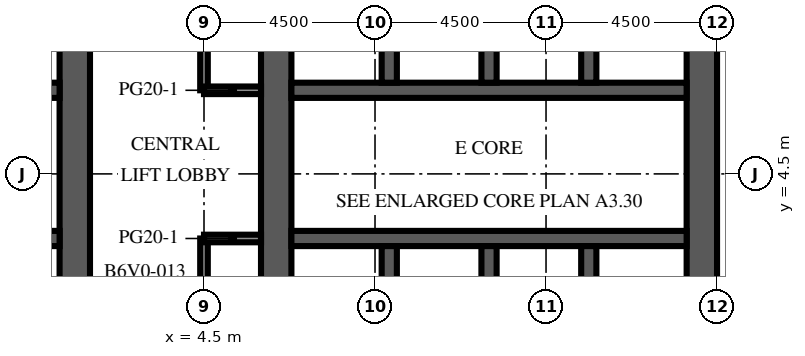
"""IFC4 building model, lengths in metres.
Left out: names, types, materials, properties, quantities, classifications, styles, units other than length and angle.
Written with IfcOpenShell. Run it as: python <this file> out.ifc"""

import sys

from ifc_helpers import new_model, si_unit, direction, frame, frame_2d, origin, place, context, subcontext, project, spatial, rectangle, extrude, element, fill, save


model = new_model("IFC4")
c1 = context("Model", 3, precision=1e-05, world=origin(), true_north=direction((0.0, 1.0)))
c2 = subcontext(c1, "Body", "Model", "MODEL_VIEW")
j1 = project(units=[si_unit("LENGTHUNIT", "METRE"), si_unit("PLANEANGLEUNIT", "RADIAN")], contexts=[c1])
p1 = place(None, origin())
s1 = spatial("IfcSite", under=j1, at=p1, CompositionType="ELEMENT")
p2 = place(p1, origin())
s2 = spatial("IfcBuilding", under=s1, at=p2, CompositionType="ELEMENT")
p3 = place(p2, frame((0.0, 0.0, 199.7)))
s3 = spatial("IfcBuildingStorey", under=s2, at=p3, CompositionType="ELEMENT", Elevation=199.7)
p4 = place(p3, frame((1.1, -9.0, 0.0), z_axis=(0.0, 0.0, 1.0), x_axis=(0.0, 1.0, 0.0)))
e1 = element("IfcWall", 1, at=p4, inside=s3, PredefinedType="SHEAR", context=c2, shape_type="SweptSolid", body=[
    extrude(rectangle(XDim=27.5, YDim=0.8, at=frame_2d((13.75, 0.0))), origin(), (0.0, 0.0, 1.0), 4.1),
])
p5 = place(p4, frame((12.55, 0.0, 0.0)))
e2 = element("IfcOpeningElement", 2, at=p5, cuts=e1, PredefinedType="OPENING", context=c2, shape_type="SweptSolid", body=[
    extrude(rectangle(XDim=2.4, YDim=2.4, at=frame_2d((1.2, 1.2))), frame((0.0, 0.41, 0.0), z_axis=(0.0, -1.0, 0.0), x_axis=(1.0, 0.0, 0.0)), (0.0, 0.0, 1.0), 0.82),
])
p6 = place(p4, frame((3.95, 0.0, 0.0)))
e3 = element("IfcOpeningElement", 3, at=p6, cuts=e1, PredefinedType="OPENING", context=c2, shape_type="SweptSolid", body=[
    extrude(rectangle(XDim=1.2, YDim=2.1, at=frame_2d((0.6, 1.05))), frame((0.0, 0.41, 0.0), z_axis=(0.0, -1.0, 0.0), x_axis=(1.0, 0.0, 0.0)), (0.0, 0.0, 1.0), 0.82),
])
p7 = place(p4, frame((19.45, 0.0, 0.0)))
e4 = element("IfcOpeningElement", 4, at=p7, cuts=e1, PredefinedType="OPENING", context=c2, shape_type="SweptSolid", body=[
    extrude(rectangle(XDim=1.0, YDim=2.1, at=frame_2d((0.5, 1.05))), frame((0.0, 0.41, 0.0), z_axis=(0.0, -1.0, 0.0), x_axis=(1.0, 0.0, 0.0)), (0.0, 0.0, 1.0), 0.82),
])
p8 = place(p4, frame((21.137, 0.0, 0.0)))
e5 = element("IfcOpeningElement", 5, at=p8, cuts=e1, PredefinedType="OPENING", context=c2, shape_type="SweptSolid", body=[
    extrude(rectangle(XDim=1.0, YDim=2.1, at=frame_2d((0.5, 1.05))), frame((0.0, 0.41, 0.0), z_axis=(0.0, -1.0, 0.0), x_axis=(1.0, 0.0, 0.0)), (0.0, 0.0, 1.0), 0.82),
])
p9 = place(p4, frame((23.2, 0.0, 0.0)))
e6 = element("IfcOpeningElement", 6, at=p9, cuts=e1, PredefinedType="OPENING", context=c2, shape_type="SweptSolid", body=[
    extrude(rectangle(XDim=1.0, YDim=2.1, at=frame_2d((0.5, 1.05))), frame((0.0, 0.41, 0.0), z_axis=(0.0, -1.0, 0.0), x_axis=(1.0, 0.0, 0.0)), (0.0, 0.0, 1.0), 0.82),
])
p10 = place(p4, frame((25.262, 0.0, 0.0)))
e7 = element("IfcOpeningElement", 7, at=p10, cuts=e1, PredefinedType="OPENING", context=c2, shape_type="SweptSolid", body=[
    extrude(rectangle(XDim=1.0, YDim=2.1, at=frame_2d((0.5, 1.05))), frame((0.0, 0.41, 0.0), z_axis=(0.0, -1.0, 0.0), x_axis=(1.0, 0.0, 0.0)), (0.0, 0.0, 1.0), 0.82),
])
p11 = place(p3, frame((-9.7, 2.8, 0.0), z_axis=(0.0, 0.0, 1.0), x_axis=(1.0, 0.0, 0.0)))
e8 = element("IfcWall", 8, at=p11, inside=s3, PredefinedType="SHEAR", context=c2, shape_type="SweptSolid", body=[
    extrude(rectangle(XDim=10.4, YDim=0.4, at=frame_2d((5.2, 0.0))), origin(), (0.0, 0.0, 1.0), 4.1),
])
p12 = place(p11, frame((0.738, 0.0, 0.0)))
e9 = element("IfcOpeningElement", 9, at=p12, cuts=e8, PredefinedType="OPENING", context=c2, shape_type="SweptSolid", body=[
    extrude(rectangle(XDim=1.1, YDim=2.1, at=frame_2d((0.55, 1.05))), frame((0.0, 0.21, 0.0), z_axis=(0.0, -1.0, 0.0), x_axis=(1.0, 0.0, 0.0)), (0.0, 0.0, 1.0), 0.42),
])
p13 = place(p11, frame((3.337, 0.0, 0.0)))
e10 = element("IfcOpeningElement", 10, at=p13, cuts=e8, PredefinedType="OPENING", context=c2, shape_type="SweptSolid", body=[
    extrude(rectangle(XDim=1.1, YDim=2.1, at=frame_2d((0.55, 1.05))), frame((0.0, 0.21, 0.0), z_axis=(0.0, -1.0, 0.0), x_axis=(1.0, 0.0, 0.0)), (0.0, 0.0, 1.0), 0.42),
])
p14 = place(p11, frame((6.012, 0.0, 0.0)))
e11 = element("IfcOpeningElement", 11, at=p14, cuts=e8, PredefinedType="OPENING", context=c2, shape_type="SweptSolid", body=[
    extrude(rectangle(XDim=1.0, YDim=2.1, at=frame_2d((0.5, 1.05))), frame((0.0, 0.21, 0.0), z_axis=(0.0, -1.0, 0.0), x_axis=(1.0, 0.0, 0.0)), (0.0, 0.0, 1.0), 0.42),
])
p15 = place(p11, frame((8.613, 0.0, 0.0)))
e12 = element("IfcOpeningElement", 12, at=p15, cuts=e8, PredefinedType="OPENING", context=c2, shape_type="SweptSolid", body=[
    extrude(rectangle(XDim=1.0, YDim=2.1, at=frame_2d((0.5, 1.05))), frame((0.0, 0.21, 0.0), z_axis=(0.0, -1.0, 0.0), x_axis=(1.0, 0.0, 0.0)), (0.0, 0.0, 1.0), 0.42),
])
p16 = place(p3, frame((-9.7, 6.7, 0.0), z_axis=(0.0, 0.0, 1.0), x_axis=(1.0, 0.0, 0.0)))
e13 = element("IfcWall", 13, at=p16, inside=s3, PredefinedType="SHEAR", context=c2, shape_type="SweptSolid", body=[
    extrude(rectangle(XDim=10.4, YDim=0.4, at=frame_2d((5.2, 0.0))), origin(), (0.0, 0.0, 1.0), 4.1),
])
p17 = place(p16, frame((3.337, 0.0, 0.0)))
e14 = element("IfcOpeningElement", 14, at=p17, cuts=e13, PredefinedType="OPENING", context=c2, shape_type="SweptSolid", body=[
    extrude(rectangle(XDim=1.1, YDim=2.1, at=frame_2d((0.55, 1.05))), frame((0.0, 0.21, 0.0), z_axis=(0.0, -1.0, 0.0), x_axis=(1.0, 0.0, 0.0)), (0.0, 0.0, 1.0), 0.42),
])
p18 = place(p16, frame((5.962, 0.0, 0.0)))
e15 = element("IfcOpeningElement", 15, at=p18, cuts=e13, PredefinedType="OPENING", context=c2, shape_type="SweptSolid", body=[
    extrude(rectangle(XDim=1.1, YDim=2.1, at=frame_2d((0.55, 1.05))), frame((0.0, 0.21, 0.0), z_axis=(0.0, -1.0, 0.0), x_axis=(1.0, 0.0, 0.0)), (0.0, 0.0, 1.0), 0.42),
])
p19 = place(p16, frame((8.663, 0.0, 0.0)))
e16 = element("IfcOpeningElement", 16, at=p19, cuts=e13, PredefinedType="OPENING", context=c2, shape_type="SweptSolid", body=[
    extrude(rectangle(XDim=1.1, YDim=2.1, at=frame_2d((0.55, 1.05))), frame((0.0, 0.21, 0.0), z_axis=(0.0, -1.0, 0.0), x_axis=(1.0, 0.0, 0.0)), (0.0, 0.0, 1.0), 0.42),
])
p20 = place(p16, frame((0.688, 0.0, 0.0)))
e17 = element("IfcOpeningElement", 17, at=p20, cuts=e13, PredefinedType="OPENING", context=c2, shape_type="SweptSolid", body=[
    extrude(rectangle(XDim=1.0, YDim=2.1, at=frame_2d((0.5, 1.05))), frame((0.0, 0.21, 0.0), z_axis=(0.0, -1.0, 0.0), x_axis=(1.0, 0.0, 0.0)), (0.0, 0.0, 1.0), 0.42),
])
p21 = place(p3, frame((6.4, -9.0, 0.0), z_axis=(0.0, 0.0, 1.0), x_axis=(0.0, 1.0, 0.0)))
e18 = element("IfcWall", 18, at=p21, inside=s3, PredefinedType="SHEAR", context=c2, shape_type="SweptSolid", body=[
    extrude(rectangle(XDim=27.5, YDim=0.8, at=frame_2d((13.75, 0.0))), origin(), (0.0, 0.0, 1.0), 4.1),
])
p22 = place(p21, frame((12.55, 0.0, 0.0)))
e19 = element("IfcOpeningElement", 19, at=p22, cuts=e18, PredefinedType="OPENING", context=c2, shape_type="SweptSolid", body=[
    extrude(rectangle(XDim=2.4, YDim=2.4, at=frame_2d((1.2, 1.2))), frame((0.0, 0.41, 0.0), z_axis=(0.0, -1.0, 0.0), x_axis=(1.0, 0.0, 0.0)), (0.0, 0.0, 1.0), 0.82),
])
p23 = place(p21, frame((3.95, 0.0, 0.0)))
e20 = element("IfcOpeningElement", 20, at=p23, cuts=e18, PredefinedType="OPENING", context=c2, shape_type="SweptSolid", body=[
    extrude(rectangle(XDim=1.2, YDim=2.1, at=frame_2d((0.6, 1.05))), frame((0.0, 0.41, 0.0), z_axis=(0.0, -1.0, 0.0), x_axis=(1.0, 0.0, 0.0)), (0.0, 0.0, 1.0), 0.82),
])
p24 = place(p21, frame((19.45, 0.0, 0.0)))
e21 = element("IfcOpeningElement", 21, at=p24, cuts=e18, PredefinedType="OPENING", context=c2, shape_type="SweptSolid", body=[
    extrude(rectangle(XDim=1.0, YDim=2.1, at=frame_2d((0.5, 1.05))), frame((0.0, 0.41, 0.0), z_axis=(0.0, -1.0, 0.0), x_axis=(1.0, 0.0, 0.0)), (0.0, 0.0, 1.0), 0.82),
])
p25 = place(p21, frame((21.137, 0.0, 0.0)))
e22 = element("IfcOpeningElement", 22, at=p25, cuts=e18, PredefinedType="OPENING", context=c2, shape_type="SweptSolid", body=[
    extrude(rectangle(XDim=1.0, YDim=2.1, at=frame_2d((0.5, 1.05))), frame((0.0, 0.41, 0.0), z_axis=(0.0, -1.0, 0.0), x_axis=(1.0, 0.0, 0.0)), (0.0, 0.0, 1.0), 0.82),
])
p26 = place(p21, frame((23.2, 0.0, 0.0)))
e23 = element("IfcOpeningElement", 23, at=p26, cuts=e18, PredefinedType="OPENING", context=c2, shape_type="SweptSolid", body=[
    extrude(rectangle(XDim=1.0, YDim=2.1, at=frame_2d((0.5, 1.05))), frame((0.0, 0.41, 0.0), z_axis=(0.0, -1.0, 0.0), x_axis=(1.0, 0.0, 0.0)), (0.0, 0.0, 1.0), 0.82),
])
p27 = place(p21, frame((25.262, 0.0, 0.0)))
e24 = element("IfcOpeningElement", 24, at=p27, cuts=e18, PredefinedType="OPENING", context=c2, shape_type="SweptSolid", body=[
    extrude(rectangle(XDim=1.0, YDim=2.1, at=frame_2d((0.5, 1.05))), frame((0.0, 0.41, 0.0), z_axis=(0.0, -1.0, 0.0), x_axis=(1.0, 0.0, 0.0)), (0.0, 0.0, 1.0), 0.82),
])
p28 = place(p3, frame((17.6, -9.0, 0.0), z_axis=(0.0, 0.0, 1.0), x_axis=(0.0, 1.0, 0.0)))
e25 = element("IfcWall", 25, at=p28, inside=s3, PredefinedType="SHEAR", context=c2, shape_type="SweptSolid", body=[
    extrude(rectangle(XDim=27.5, YDim=0.8, at=frame_2d((13.75, 0.0))), origin(), (0.0, 0.0, 1.0), 4.1),
])
p29 = place(p28, frame((12.55, 0.0, 0.0)))
e26 = element("IfcOpeningElement", 26, at=p29, cuts=e25, PredefinedType="OPENING", context=c2, shape_type="SweptSolid", body=[
    extrude(rectangle(XDim=2.4, YDim=2.4, at=frame_2d((1.2, 1.2))), frame((0.0, 0.41, 0.0), z_axis=(0.0, -1.0, 0.0), x_axis=(1.0, 0.0, 0.0)), (0.0, 0.0, 1.0), 0.82),
])
p30 = place(p28, frame((6.825, 0.0, 0.0)))
e27 = element("IfcOpeningElement", 27, at=p30, cuts=e25, PredefinedType="OPENING", context=c2, shape_type="SweptSolid", body=[
    extrude(rectangle(XDim=1.2, YDim=2.1, at=frame_2d((0.6, 1.05))), frame((0.0, 0.41, 0.0), z_axis=(0.0, -1.0, 0.0), x_axis=(1.0, 0.0, 0.0)), (0.0, 0.0, 1.0), 0.82),
])
p31 = place(p28, frame((19.475, 0.0, 0.0)))
e28 = element("IfcOpeningElement", 28, at=p31, cuts=e25, PredefinedType="OPENING", context=c2, shape_type="SweptSolid", body=[
    extrude(rectangle(XDim=1.2, YDim=2.1, at=frame_2d((0.6, 1.05))), frame((0.0, 0.41, 0.0), z_axis=(0.0, -1.0, 0.0), x_axis=(1.0, 0.0, 0.0)), (0.0, 0.0, 1.0), 0.82),
])
p32 = place(p3, frame((6.8, 2.8, 0.0), z_axis=(0.0, 0.0, 1.0), x_axis=(1.0, 0.0, 0.0)))
e29 = element("IfcWall", 29, at=p32, inside=s3, PredefinedType="SHEAR", context=c2, shape_type="SweptSolid", body=[
    extrude(rectangle(XDim=10.4, YDim=0.4, at=frame_2d((5.2, 0.0))), origin(), (0.0, 0.0, 1.0), 4.1),
])
p33 = place(p32, frame((0.738, 0.0, 0.0)))
e30 = element("IfcOpeningElement", 30, at=p33, cuts=e29, PredefinedType="OPENING", context=c2, shape_type="SweptSolid", body=[
    extrude(rectangle(XDim=1.1, YDim=2.1, at=frame_2d((0.55, 1.05))), frame((0.0, 0.21, 0.0), z_axis=(0.0, -1.0, 0.0), x_axis=(1.0, 0.0, 0.0)), (0.0, 0.0, 1.0), 0.42),
])
p34 = place(p32, frame((3.337, 0.0, 0.0)))
e31 = element("IfcOpeningElement", 31, at=p34, cuts=e29, PredefinedType="OPENING", context=c2, shape_type="SweptSolid", body=[
    extrude(rectangle(XDim=1.1, YDim=2.1, at=frame_2d((0.55, 1.05))), frame((0.0, 0.21, 0.0), z_axis=(0.0, -1.0, 0.0), x_axis=(1.0, 0.0, 0.0)), (0.0, 0.0, 1.0), 0.42),
])
p35 = place(p32, frame((6.012, 0.0, 0.0)))
e32 = element("IfcOpeningElement", 32, at=p35, cuts=e29, PredefinedType="OPENING", context=c2, shape_type="SweptSolid", body=[
    extrude(rectangle(XDim=1.0, YDim=2.1, at=frame_2d((0.5, 1.05))), frame((0.0, 0.21, 0.0), z_axis=(0.0, -1.0, 0.0), x_axis=(1.0, 0.0, 0.0)), (0.0, 0.0, 1.0), 0.42),
])
p36 = place(p32, frame((8.613, 0.0, 0.0)))
e33 = element("IfcOpeningElement", 33, at=p36, cuts=e29, PredefinedType="OPENING", context=c2, shape_type="SweptSolid", body=[
    extrude(rectangle(XDim=1.0, YDim=2.1, at=frame_2d((0.5, 1.05))), frame((0.0, 0.21, 0.0), z_axis=(0.0, -1.0, 0.0), x_axis=(1.0, 0.0, 0.0)), (0.0, 0.0, 1.0), 0.42),
])
p37 = place(p3, frame((6.8, 6.7, 0.0), z_axis=(0.0, 0.0, 1.0), x_axis=(1.0, 0.0, 0.0)))
e34 = element("IfcWall", 34, at=p37, inside=s3, PredefinedType="SHEAR", context=c2, shape_type="SweptSolid", body=[
    extrude(rectangle(XDim=10.4, YDim=0.4, at=frame_2d((5.2, 0.0))), origin(), (0.0, 0.0, 1.0), 4.1),
])
p38 = place(p37, frame((3.337, 0.0, 0.0)))
e35 = element("IfcOpeningElement", 35, at=p38, cuts=e34, PredefinedType="OPENING", context=c2, shape_type="SweptSolid", body=[
    extrude(rectangle(XDim=1.1, YDim=2.1, at=frame_2d((0.55, 1.05))), frame((0.0, 0.21, 0.0), z_axis=(0.0, -1.0, 0.0), x_axis=(1.0, 0.0, 0.0)), (0.0, 0.0, 1.0), 0.42),
])
p39 = place(p37, frame((5.962, 0.0, 0.0)))
e36 = element("IfcOpeningElement", 36, at=p39, cuts=e34, PredefinedType="OPENING", context=c2, shape_type="SweptSolid", body=[
    extrude(rectangle(XDim=1.1, YDim=2.1, at=frame_2d((0.55, 1.05))), frame((0.0, 0.21, 0.0), z_axis=(0.0, -1.0, 0.0), x_axis=(1.0, 0.0, 0.0)), (0.0, 0.0, 1.0), 0.42),
])
p40 = place(p37, frame((8.663, 0.0, 0.0)))
e37 = element("IfcOpeningElement", 37, at=p40, cuts=e34, PredefinedType="OPENING", context=c2, shape_type="SweptSolid", body=[
    extrude(rectangle(XDim=1.1, YDim=2.1, at=frame_2d((0.55, 1.05))), frame((0.0, 0.21, 0.0), z_axis=(0.0, -1.0, 0.0), x_axis=(1.0, 0.0, 0.0)), (0.0, 0.0, 1.0), 0.42),
])
p41 = place(p37, frame((0.688, 0.0, 0.0)))
e38 = element("IfcOpeningElement", 38, at=p41, cuts=e34, PredefinedType="OPENING", context=c2, shape_type="SweptSolid", body=[
    extrude(rectangle(XDim=1.0, YDim=2.1, at=frame_2d((0.5, 1.05))), frame((0.0, 0.21, 0.0), z_axis=(0.0, -1.0, 0.0), x_axis=(1.0, 0.0, 0.0)), (0.0, 0.0, 1.0), 0.42),
])
for number, where, z_axis, x_axis in (
    (39, (9.375, -0.3, 0.0), (0.0, 0.0, 1.0), (0.0, 1.0, 0.0)),
    (40, (9.375, 6.9, 0.0), (0.0, 0.0, 1.0), (0.0, 1.0, 0.0)),
    (41, (12.0, -0.3, 0.0), (0.0, 0.0, 1.0), (0.0, 1.0, 0.0)),
    (42, (12.0, 6.9, 0.0), (0.0, 0.0, 1.0), (0.0, 1.0, 0.0)),
    (43, (14.625, -0.3, 0.0), (0.0, 0.0, 1.0), (0.0, 1.0, 0.0)),
    (44, (14.625, 6.9, 0.0), (0.0, 0.0, 1.0), (0.0, 1.0, 0.0)),
):
    element("IfcWall", number, at=place(p3, frame(where, z_axis=z_axis, x_axis=x_axis)), inside=s3, PredefinedType="SHEAR", context=c2, shape_type="SweptSolid", body=[
        extrude(rectangle(XDim=2.9, YDim=0.4, at=frame_2d((1.45, 0.0))), origin(), (0.0, 0.0, 1.0), 4.1),
    ])
p42 = place(p3, frame((4.5, 2.8, 0.0), z_axis=(0.0, 0.0, 1.0), x_axis=(0.0, -1.0, 0.0)))
e45 = element("IfcWall", 45, at=p42, inside=s3, PredefinedType="PARTITIONING", context=c2, shape_type="SweptSolid", body=[
    extrude(rectangle(XDim=6.3, YDim=0.2, at=frame_2d((3.15, 0.0))), origin(), (0.0, 0.0, 1.0), 3.65),
])
p43 = place(p42, frame((1.95, 0.0, 0.0)))
e46 = element("IfcOpeningElement", 46, at=p43, cuts=e45, PredefinedType="OPENING", context=c2, shape_type="SweptSolid", body=[
    extrude(rectangle(XDim=1.0, YDim=2.1, at=frame_2d((0.5, 1.05))), frame((0.0, 0.11, 0.0), z_axis=(0.0, -1.0, 0.0), x_axis=(1.0, 0.0, 0.0)), (0.0, 0.0, 1.0), 0.22),
])
p44 = place(p3, frame((4.5, 18.5, 0.0), z_axis=(0.0, 0.0, 1.0), x_axis=(0.0, -1.0, 0.0)))
e47 = element("IfcWall", 47, at=p44, inside=s3, PredefinedType="PARTITIONING", context=c2, shape_type="SweptSolid", body=[
    extrude(rectangle(XDim=11.8, YDim=0.2, at=frame_2d((5.9, 0.0))), origin(), (0.0, 0.0, 1.0), 3.65),
])
p45 = place(p44, frame((4.95, 0.0, 0.0)))
e48 = element("IfcOpeningElement", 48, at=p45, cuts=e47, PredefinedType="OPENING", context=c2, shape_type="SweptSolid", body=[
    extrude(rectangle(XDim=1.0, YDim=2.1, at=frame_2d((0.5, 1.05))), frame((0.0, 0.11, 0.0), z_axis=(0.0, -1.0, 0.0), x_axis=(1.0, 0.0, 0.0)), (0.0, 0.0, 1.0), 0.22),
])
for number, where, z_axis, x_axis in (
    (49, (4.5, 2.8, 0.0), (0.0, 0.0, 1.0), (1.0, 0.0, 0.0)),
    (50, (4.5, 6.7, 0.0), (0.0, 0.0, 1.0), (1.0, 0.0, 0.0)),
):
    element("IfcWall", number, at=place(p3, frame(where, z_axis=z_axis, x_axis=x_axis)), inside=s3, PredefinedType="PARTITIONING", context=c2, shape_type="SweptSolid", body=[
        extrude(rectangle(XDim=1.5, YDim=0.2, at=frame_2d((0.75, 0.0))), origin(), (0.0, 0.0, 1.0), 3.65),
    ])
p46 = place(p33, origin())
e51 = element("IfcDoor", 51, at=p46, inside=s3, OperationType="DOUBLE_DOOR_SLIDING", PredefinedType="DOOR", context=c2, shape_type="SweptSolid", body=[
    extrude(rectangle(XDim=1.1, YDim=2.1, at=frame_2d((0.55, 1.05))), frame((0.0, 0.025, 0.0), z_axis=(0.0, -1.0, 0.0), x_axis=(1.0, 0.0, 0.0)), (0.0, 0.0, 1.0), 0.05),
])
fill(e30, e51)
p47 = place(p34, origin())
e52 = element("IfcDoor", 52, at=p47, inside=s3, OperationType="DOUBLE_DOOR_SLIDING", PredefinedType="DOOR", context=c2, shape_type="SweptSolid", body=[
    extrude(rectangle(XDim=1.1, YDim=2.1, at=frame_2d((0.55, 1.05))), frame((0.0, 0.025, 0.0), z_axis=(0.0, -1.0, 0.0), x_axis=(1.0, 0.0, 0.0)), (0.0, 0.0, 1.0), 0.05),
])
fill(e31, e52)
p48 = place(p38, origin())
e53 = element("IfcDoor", 53, at=p48, inside=s3, OperationType="DOUBLE_DOOR_SLIDING", PredefinedType="DOOR", context=c2, shape_type="SweptSolid", body=[
    extrude(rectangle(XDim=1.1, YDim=2.1, at=frame_2d((0.55, 1.05))), frame((0.0, 0.025, 0.0), z_axis=(0.0, -1.0, 0.0), x_axis=(1.0, 0.0, 0.0)), (0.0, 0.0, 1.0), 0.05),
])
fill(e35, e53)
p49 = place(p39, origin())
e54 = element("IfcDoor", 54, at=p49, inside=s3, OperationType="DOUBLE_DOOR_SLIDING", PredefinedType="DOOR", context=c2, shape_type="SweptSolid", body=[
    extrude(rectangle(XDim=1.1, YDim=2.1, at=frame_2d((0.55, 1.05))), frame((0.0, 0.025, 0.0), z_axis=(0.0, -1.0, 0.0), x_axis=(1.0, 0.0, 0.0)), (0.0, 0.0, 1.0), 0.05),
])
fill(e36, e54)
p50 = place(p40, origin())
e55 = element("IfcDoor", 55, at=p50, inside=s3, OperationType="DOUBLE_DOOR_SLIDING", PredefinedType="DOOR", context=c2, shape_type="SweptSolid", body=[
    extrude(rectangle(XDim=1.1, YDim=2.1, at=frame_2d((0.55, 1.05))), frame((0.0, 0.025, 0.0), z_axis=(0.0, -1.0, 0.0), x_axis=(1.0, 0.0, 0.0)), (0.0, 0.0, 1.0), 0.05),
])
fill(e37, e55)
p51 = place(p5, origin())
e56 = element("IfcDoor", 56, at=p51, inside=s3, OperationType="DOUBLE_DOOR_DOUBLE_SWING", PredefinedType="DOOR", context=c2, shape_type="SweptSolid", body=[
    extrude(rectangle(XDim=2.4, YDim=2.4, at=frame_2d((1.2, 1.2))), frame((0.0, 0.025, 0.0), z_axis=(0.0, -1.0, 0.0), x_axis=(1.0, 0.0, 0.0)), (0.0, 0.0, 1.0), 0.05),
])
fill(e2, e56)
p52 = place(p22, origin())
e57 = element("IfcDoor", 57, at=p52, inside=s3, OperationType="DOUBLE_DOOR_DOUBLE_SWING", PredefinedType="DOOR", context=c2, shape_type="SweptSolid", body=[
    extrude(rectangle(XDim=2.4, YDim=2.4, at=frame_2d((1.2, 1.2))), frame((0.0, 0.025, 0.0), z_axis=(0.0, -1.0, 0.0), x_axis=(1.0, 0.0, 0.0)), (0.0, 0.0, 1.0), 0.05),
])
fill(e19, e57)
p53 = place(p29, origin())
e58 = element("IfcDoor", 58, at=p53, inside=s3, OperationType="DOUBLE_DOOR_DOUBLE_SWING", PredefinedType="DOOR", context=c2, shape_type="SweptSolid", body=[
    extrude(rectangle(XDim=2.4, YDim=2.4, at=frame_2d((1.2, 1.2))), frame((0.0, 0.025, 0.0), z_axis=(0.0, -1.0, 0.0), x_axis=(1.0, 0.0, 0.0)), (0.0, 0.0, 1.0), 0.05),
])
fill(e26, e58)
p54 = place(p35, origin())
e59 = element("IfcDoor", 59, at=p54, inside=s3, OperationType="SINGLE_SWING_LEFT", PredefinedType="DOOR", context=c2, shape_type="SweptSolid", body=[
    extrude(rectangle(XDim=1.0, YDim=2.1, at=frame_2d((0.5, 1.05))), frame((0.0, 0.025, 0.0), z_axis=(0.0, -1.0, 0.0), x_axis=(1.0, 0.0, 0.0)), (0.0, 0.0, 1.0), 0.05),
])
fill(e32, e59)
p55 = place(p36, origin())
e60 = element("IfcDoor", 60, at=p55, inside=s3, OperationType="SINGLE_SWING_RIGHT", PredefinedType="DOOR", context=c2, shape_type="SweptSolid", body=[
    extrude(rectangle(XDim=1.0, YDim=2.1, at=frame_2d((0.5, 1.05))), frame((0.0, 0.025, 0.0), z_axis=(0.0, -1.0, 0.0), x_axis=(1.0, 0.0, 0.0)), (0.0, 0.0, 1.0), 0.05),
])
fill(e33, e60)
p56 = place(p41, origin())
e61 = element("IfcDoor", 61, at=p56, inside=s3, OperationType="SINGLE_SWING_LEFT", PredefinedType="DOOR", context=c2, shape_type="SweptSolid", body=[
    extrude(rectangle(XDim=1.0, YDim=2.1, at=frame_2d((0.5, 1.05))), frame((0.0, 0.025, 0.0), z_axis=(0.0, -1.0, 0.0), x_axis=(1.0, 0.0, 0.0)), (0.0, 0.0, 1.0), 0.05),
])
fill(e38, e61)
save(model, sys.argv[1])
